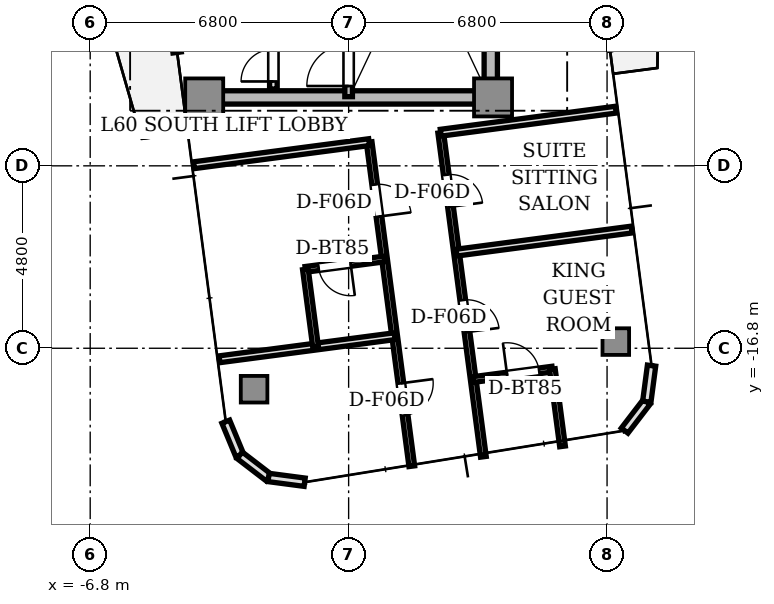
"""IFC4 building model, lengths in metres.
Left out: names, types, materials, properties, quantities, classifications, styles, units other than length and angle.
Written with IfcOpenShell. Run it as: python <this file> out.ifc"""

import sys

from ifc_helpers import new_model, si_unit, direction, frame, frame_2d, origin, origin_2d, place, context, subcontext, project, spatial, rectangle, extrude, source, transform, mapped, element, fill, save


model = new_model("IFC4")
c1 = context("Model", 3, precision=1e-05, world=origin(), true_north=direction((0.0, 1.0)))
c2 = subcontext(c1, "Body", "Model", "MODEL_VIEW")
j1 = project(units=[si_unit("LENGTHUNIT", "METRE"), si_unit("PLANEANGLEUNIT", "RADIAN")], contexts=[c1])
p1 = place(None, origin())
s1 = spatial("IfcSite", under=j1, at=p1, CompositionType="ELEMENT")
p2 = place(p1, origin())
s2 = spatial("IfcBuilding", under=s1, at=p2, CompositionType="ELEMENT")
p3 = place(p2, frame((0.0, 0.0, 216.55)))
s3 = spatial("IfcBuildingStorey", under=s2, at=p3, CompositionType="ELEMENT", Elevation=216.55)
p4 = place(p3, frame((-3.55, -10.2, 0.0), z_axis=(0.0, 0.0, 1.0), x_axis=(1.0, 0.0, 0.0)))
e1 = element("IfcWall", 1, at=p4, inside=s3, PredefinedType="SHEAR", context=c2, shape_type="SweptSolid", body=[
    extrude(rectangle(XDim=7.1, YDim=0.35, at=frame_2d((3.55, 0.0))), origin(), (0.0, 0.0, 1.0), 3.11),
])
p5 = place(p3, frame((3.74, -9.75, 0.0), z_axis=(0.0, 0.0, 1.0), x_axis=(0.0, 1.0, 0.0)))
e2 = element("IfcWall", 2, at=p5, inside=s3, PredefinedType="SHEAR", context=c2, shape_type="SweptSolid", body=[
    extrude(rectangle(XDim=6.9, YDim=0.35, at=frame_2d((3.45, 0.0))), origin(), (0.0, 0.0, 1.0), 3.11),
])
m1 = source(origin(), c2, "Body", "SweptSolid", [
    extrude(rectangle(XDim=1.0, YDim=1.0, at=origin_2d()), origin(), (0.0, 0.0, 1.0), 3.11),
])
for number, where, z_axis, x_axis in (
    (3, (-3.8, -10.2, 0.0), (0.0, 0.0, 1.0), (1.0, 0.0, 0.0)),
    (4, (3.8, -10.2, 0.0), (0.0, 0.0, 1.0), (1.0, 0.0, 0.0)),
):
    element("IfcColumn", number, at=place(p3, frame(where, z_axis=z_axis, x_axis=x_axis)), inside=s3, PredefinedType="COLUMN", context=c2, shape_type="MappedRepresentation", body=[
        mapped(m1, transform((0.0, 0.0, 0.0), scale=1.0)),
    ])
m2 = source(origin(), c2, "Body", "SweptSolid", [
    extrude(rectangle(XDim=0.7, YDim=0.7, at=origin_2d()), origin(), (0.0, 0.0, 1.0), 3.11),
])
for number, where, z_axis, x_axis in (
    (5, (-2.488, -17.878, 0.0), (0.0, 0.0, 1.0), (1.0, 0.0, 0.0)),
    (6, (7.03, -16.625, 0.0), (0.0, 0.0, 1.0), (1.0, 0.0, 0.0)),
):
    element("IfcColumn", number, at=place(p3, frame(where, z_axis=z_axis, x_axis=x_axis)), inside=s3, PredefinedType="COLUMN", context=c2, shape_type="MappedRepresentation", body=[
        mapped(m2, transform((0.0, 0.0, 0.0), scale=1.0)),
    ])
p6 = place(p3, frame((-4.864, -6.339, 0.0), z_axis=(0.0, 0.0, 1.0), x_axis=(0.130564442062, -0.991439824936, 0.0)))
e7 = element("IfcWall", 7, at=p6, inside=s3, PredefinedType="STANDARD", context=c2, shape_type="SweptSolid", body=[
    extrude(rectangle(XDim=2.7, YDim=0.22, at=frame_2d((1.35, 0.0))), origin(), (0.0, 0.0, 1.0), 3.11),
])
p7 = place(p6, frame((1.4, 0.0, 0.0)))
e8 = element("IfcOpeningElement", 8, at=p7, cuts=e7, PredefinedType="OPENING", context=c2, shape_type="SweptSolid", body=[
    extrude(rectangle(XDim=1.0, YDim=2.2, at=frame_2d((0.5, 1.1))), frame((0.0, 0.12, 0.0), z_axis=(0.0, -1.0, 0.0), x_axis=(1.0, 0.0, 0.0)), (0.0, 0.0, 1.0), 0.24),
])
for number, where, z_axis, x_axis in (
    (9, (-3.233, -18.732, 0.0), (0.0, 0.0, 1.0), (0.383, -0.924, 0.0)),
    (10, (-2.866, -19.617, 0.0), (0.0, 0.0, 1.0), (0.793, -0.609, 0.0)),
    (11, (-2.106, -20.2, 0.0), (0.0, 0.0, 1.0), (0.991, -0.131, 0.0)),
):
    element("IfcWall", number, at=place(p3, frame(where, z_axis=z_axis, x_axis=x_axis)), inside=s3, PredefinedType="STANDARD", context=c2, shape_type="SweptSolid", body=[
        extrude(rectangle(XDim=0.958, YDim=0.22, at=frame_2d((0.479, 0.0))), origin(), (0.0, 0.0, 1.0), 3.11),
    ])
p8 = place(p3, frame((7.263, -18.966, 0.0), z_axis=(0.0, 0.0, 1.0), x_axis=(0.608897151398, 0.793249178392, 0.0)))
e12 = element("IfcWall", 12, at=p8, inside=s3, PredefinedType="STANDARD", context=c2, shape_type="SweptSolid", body=[
    extrude(rectangle(XDim=0.958, YDim=0.22, at=frame_2d((0.479, 0.0))), origin(), (0.0, 0.0, 1.0), 3.11),
])
p9 = place(p3, frame((7.846, -18.207, 0.0), z_axis=(0.0, 0.0, 1.0), x_axis=(0.130527053476, 0.991444747987, 0.0)))
e13 = element("IfcWall", 13, at=p9, inside=s3, PredefinedType="STANDARD", context=c2, shape_type="SweptSolid", body=[
    extrude(rectangle(XDim=0.958, YDim=0.22, at=frame_2d((0.479, 0.0))), origin(), (0.0, 0.0, 1.0), 3.11),
])
p10 = place(p3, frame((0.0, -10.18, 0.0), z_axis=(0.0, 0.0, 1.0), x_axis=(0.0, 1.0, 0.0)))
e14 = element("IfcWall", 14, at=p10, inside=s3, PredefinedType="SOLIDWALL", context=c2, shape_type="SweptSolid", body=[
    extrude(rectangle(XDim=7.68, YDim=0.2, at=frame_2d((3.84, 0.0))), origin(), (0.0, 0.0, 1.0), 3.11),
])
p11 = place(p10, frame((0.28, 0.0, 0.0)))
e15 = element("IfcOpeningElement", 15, at=p11, cuts=e14, PredefinedType="OPENING", context=c2, shape_type="SweptSolid", body=[
    extrude(rectangle(XDim=1.1, YDim=2.15, at=frame_2d((0.55, 1.075))), frame((0.0, 0.11, 0.0), z_axis=(0.0, -1.0, 0.0), x_axis=(1.0, 0.0, 0.0)), (0.0, 0.0, 1.0), 0.22),
])
p12 = place(p3, frame((-1.98, -9.98, 0.0), z_axis=(0.0, 0.0, 1.0), x_axis=(0.0, 1.0, 0.0)))
e16 = element("IfcWall", 16, at=p12, inside=s3, PredefinedType="SOLIDWALL", context=c2, shape_type="SweptSolid", body=[
    extrude(rectangle(XDim=4.66, YDim=0.2, at=frame_2d((2.33, 0.0))), origin(), (0.0, 0.0, 1.0), 2.66),
])
p13 = place(p12, frame((0.2, 0.0, 0.0)))
e17 = element("IfcOpeningElement", 17, at=p13, cuts=e16, PredefinedType="OPENING", context=c2, shape_type="SweptSolid", body=[
    extrude(rectangle(XDim=0.85, YDim=2.1, at=frame_2d((0.425, 1.05))), frame((0.0, 0.11, 0.0), z_axis=(0.0, -1.0, 0.0), x_axis=(1.0, 0.0, 0.0)), (0.0, 0.0, 1.0), 0.22),
])
p14 = place(p3, frame((2.423, -11.129, 0.0), z_axis=(0.0, 0.0, 1.0), x_axis=(0.130530885115, -0.991444243531, 0.0)))
e18 = element("IfcWall", 18, at=p14, inside=s3, PredefinedType="PARTITIONING", context=c2, shape_type="SweptSolid", body=[
    extrude(rectangle(XDim=8.6, YDim=0.15, at=frame_2d((4.3, 0.0))), origin(), (0.0, 0.0, 1.0), 2.66),
])
p15 = place(p14, frame((1.116, 0.0, 0.0)))
e19 = element("IfcOpeningElement", 19, at=p15, cuts=e18, PredefinedType="OPENING", context=c2, shape_type="SweptSolid", body=[
    extrude(rectangle(XDim=0.85, YDim=2.1, at=frame_2d((0.425, 1.05))), frame((0.0, 0.085, 0.0), z_axis=(0.0, -1.0, 0.0), x_axis=(1.0, 0.0, 0.0)), (0.0, 0.0, 1.0), 0.17),
])
p16 = place(p14, frame((4.441, 0.0, 0.0)))
e20 = element("IfcOpeningElement", 20, at=p16, cuts=e18, PredefinedType="OPENING", context=c2, shape_type="SweptSolid", body=[
    extrude(rectangle(XDim=0.85, YDim=2.1, at=frame_2d((0.425, 1.05))), frame((0.0, 0.085, 0.0), z_axis=(0.0, -1.0, 0.0), x_axis=(1.0, 0.0, 0.0)), (0.0, 0.0, 1.0), 0.17),
])
p17 = place(p3, frame((0.54, -11.377, 0.0), z_axis=(0.0, 0.0, 1.0), x_axis=(0.130530885115, -0.991444243531, 0.0)))
e21 = element("IfcWall", 21, at=p17, inside=s3, PredefinedType="PARTITIONING", context=c2, shape_type="SweptSolid", body=[
    extrude(rectangle(XDim=8.6, YDim=0.15, at=frame_2d((4.3, 0.0))), origin(), (0.0, 0.0, 1.0), 2.66),
])
p18 = place(p17, frame((1.125, 0.0, 0.0)))
e22 = element("IfcOpeningElement", 22, at=p18, cuts=e21, PredefinedType="OPENING", context=c2, shape_type="SweptSolid", body=[
    extrude(rectangle(XDim=0.85, YDim=2.1, at=frame_2d((0.425, 1.05))), frame((0.0, 0.085, 0.0), z_axis=(0.0, -1.0, 0.0), x_axis=(1.0, 0.0, 0.0)), (0.0, 0.0, 1.0), 0.17),
])
p19 = place(p17, frame((6.4, 0.0, 0.0)))
e23 = element("IfcOpeningElement", 23, at=p19, cuts=e21, PredefinedType="OPENING", context=c2, shape_type="SweptSolid", body=[
    extrude(rectangle(XDim=0.85, YDim=2.1, at=frame_2d((0.425, 1.05))), frame((0.0, 0.085, 0.0), z_axis=(0.0, -1.0, 0.0), x_axis=(1.0, 0.0, 0.0)), (0.0, 0.0, 1.0), 0.17),
])
p20 = place(p3, frame((2.423, -11.129, 0.0), z_axis=(0.0, 0.0, 1.0), x_axis=(0.991445715827, 0.13051970184, 0.0)))
e24 = element("IfcWall", 24, at=p20, inside=s3, PredefinedType="PARTITIONING", context=c2, shape_type="SweptSolid", body=[
    extrude(rectangle(XDim=4.65, YDim=0.18, at=frame_2d((2.325, 0.0))), origin(), (0.0, 0.0, 1.0), 2.66),
])
p21 = place(p3, frame((-4.071, -11.984, 0.0), z_axis=(0.0, 0.0, 1.0), x_axis=(0.991444821367, 0.130526496103, 0.0)))
e25 = element("IfcWall", 25, at=p21, inside=s3, PredefinedType="PARTITIONING", context=c2, shape_type="SweptSolid", body=[
    extrude(rectangle(XDim=4.65, YDim=0.18, at=frame_2d((2.325, 0.0))), origin(), (0.0, 0.0, 1.0), 2.66),
])
p22 = place(p3, frame((2.839, -14.284, 0.0), z_axis=(0.0, 0.0, 1.0), x_axis=(0.991445715827, 0.13051970184, 0.0)))
e26 = element("IfcWall", 26, at=p22, inside=s3, PredefinedType="PARTITIONING", context=c2, shape_type="SweptSolid", body=[
    extrude(rectangle(XDim=4.65, YDim=0.18, at=frame_2d((2.325, 0.0))), origin(), (0.0, 0.0, 1.0), 2.66),
])
p23 = place(p3, frame((3.278, -17.623, 0.0), z_axis=(0.0, 0.0, 1.0), x_axis=(0.9914558783, 0.13044248305, 0.0)))
e27 = element("IfcWall", 27, at=p23, inside=s3, PredefinedType="PARTITIONING", context=c2, shape_type="SweptSolid", body=[
    extrude(rectangle(XDim=2.1, YDim=0.15, at=frame_2d((1.05, 0.0))), origin(), (0.0, 0.0, 1.0), 2.66),
])
p24 = place(p23, frame((0.9, 0.0, 0.0)))
e28 = element("IfcOpeningElement", 28, at=p24, cuts=e27, PredefinedType="OPENING", context=c2, shape_type="SweptSolid", body=[
    extrude(rectangle(XDim=0.85, YDim=2.1, at=frame_2d((0.425, 1.05))), frame((0.0, 0.085, 0.0), z_axis=(0.0, -1.0, 0.0), x_axis=(1.0, 0.0, 0.0)), (0.0, 0.0, 1.0), 0.17),
])
p25 = place(p3, frame((5.36, -17.349, 0.0), z_axis=(0.0, 0.0, 1.0), x_axis=(0.130540781221, -0.991442940586, 0.0)))
e29 = element("IfcWall", 29, at=p25, inside=s3, PredefinedType="PARTITIONING", context=c2, shape_type="SweptSolid", body=[
    extrude(rectangle(XDim=2.05, YDim=0.15, at=frame_2d((1.025, 0.0))), origin(), (0.0, 0.0, 1.0), 2.66),
])
p26 = place(p3, frame((1.212, -16.483, 0.0), z_axis=(0.0, 0.0, 1.0), x_axis=(-0.991445715827, -0.13051970184, 0.0)))
e30 = element("IfcWall", 30, at=p26, inside=s3, PredefinedType="PARTITIONING", context=c2, shape_type="SweptSolid", body=[
    extrude(rectangle(XDim=4.65, YDim=0.18, at=frame_2d((2.325, 0.0))), origin(), (0.0, 0.0, 1.0), 2.66),
])
p27 = place(p3, frame((0.944, -14.45, 0.0), z_axis=(0.0, 0.0, 1.0), x_axis=(-0.991438854462, -0.130571811136, 0.0)))
e31 = element("IfcWall", 31, at=p27, inside=s3, PredefinedType="PARTITIONING", context=c2, shape_type="SweptSolid", body=[
    extrude(rectangle(XDim=2.1, YDim=0.15, at=frame_2d((1.05, 0.0))), origin(), (0.0, 0.0, 1.0), 2.66),
])
p28 = place(p27, frame((0.9, 0.0, 0.0)))
e32 = element("IfcOpeningElement", 32, at=p28, cuts=e31, PredefinedType="OPENING", context=c2, shape_type="SweptSolid", body=[
    extrude(rectangle(XDim=0.85, YDim=2.1, at=frame_2d((0.425, 1.05))), frame((0.0, 0.085, 0.0), z_axis=(0.0, -1.0, 0.0), x_axis=(1.0, 0.0, 0.0)), (0.0, 0.0, 1.0), 0.17),
])
p29 = place(p3, frame((-1.138, -14.725, 0.0), z_axis=(0.0, 0.0, 1.0), x_axis=(0.130540781221, -0.991442940586, 0.0)))
e33 = element("IfcWall", 33, at=p29, inside=s3, PredefinedType="PARTITIONING", context=c2, shape_type="SweptSolid", body=[
    extrude(rectangle(XDim=2.05, YDim=0.15, at=frame_2d((1.025, 0.0))), origin(), (0.0, 0.0, 1.0), 2.66),
])
m3 = source(origin(), c2, "Body", "SweptSolid", [
    extrude(rectangle(XDim=1.1, YDim=0.05, at=origin_2d()), origin(), (0.0, 0.0, 1.0), 2.15),
])
p30 = place(p11, frame((0.55, 0.0, 0.0)))
e34 = element("IfcDoor", 34, at=p30, inside=s3, OperationType="SINGLE_SWING_LEFT", PredefinedType="DOOR", context=c2, shape_type="MappedRepresentation", body=[
    mapped(m3, transform((0.0, 0.0, 0.0), scale=1.0)),
])
fill(e15, e34)
m4 = source(origin(), c2, "Body", "SweptSolid", [
    extrude(rectangle(XDim=0.85, YDim=0.05, at=origin_2d()), origin(), (0.0, 0.0, 1.0), 2.1),
])
p31 = place(p13, frame((0.425, 0.0, 0.0)))
e35 = element("IfcDoor", 35, at=p31, inside=s3, OperationType="SINGLE_SWING_LEFT", PredefinedType="DOOR", context=c2, shape_type="MappedRepresentation", body=[
    mapped(m4, transform((0.0, 0.0, 0.0), scale=1.0)),
])
fill(e17, e35)
p32 = place(p15, frame((0.425, 0.0, 0.0)))
e36 = element("IfcDoor", 36, at=p32, inside=s3, OperationType="SINGLE_SWING_RIGHT", PredefinedType="DOOR", context=c2, shape_type="MappedRepresentation", body=[
    mapped(m4, transform((0.0, 0.0, 0.0), scale=1.0)),
])
fill(e19, e36)
p33 = place(p24, frame((0.425, 0.0, 0.0)))
e37 = element("IfcDoor", 37, at=p33, inside=s3, OperationType="SINGLE_SWING_LEFT", PredefinedType="DOOR", context=c2, shape_type="MappedRepresentation", body=[
    mapped(m4, transform((0.0, 0.0, 0.0), scale=1.0)),
])
fill(e28, e37)
p34 = place(p16, frame((0.425, 0.0, 0.0)))
e38 = element("IfcDoor", 38, at=p34, inside=s3, OperationType="SINGLE_SWING_RIGHT", PredefinedType="DOOR", context=c2, shape_type="MappedRepresentation", body=[
    mapped(m4, transform((0.0, 0.0, 0.0), scale=1.0)),
])
fill(e20, e38)
p35 = place(p28, frame((0.425, 0.0, 0.0)))
e39 = element("IfcDoor", 39, at=p35, inside=s3, OperationType="SINGLE_SWING_LEFT", PredefinedType="DOOR", context=c2, shape_type="MappedRepresentation", body=[
    mapped(m4, transform((0.0, 0.0, 0.0), scale=1.0)),
])
fill(e32, e39)
p36 = place(p18, frame((0.425, 0.0, 0.0)))
e40 = element("IfcDoor", 40, at=p36, inside=s3, OperationType="SINGLE_SWING_RIGHT", PredefinedType="DOOR", context=c2, shape_type="MappedRepresentation", body=[
    mapped(m4, transform((0.0, 0.0, 0.0), scale=1.0)),
])
fill(e22, e40)
p37 = place(p19, frame((0.425, 0.0, 0.0)))
e41 = element("IfcDoor", 41, at=p37, inside=s3, OperationType="SINGLE_SWING_LEFT", PredefinedType="DOOR", context=c2, shape_type="MappedRepresentation", body=[
    mapped(m4, transform((0.0, 0.0, 0.0), scale=1.0)),
])
fill(e23, e41)
save(model, sys.argv[1])
